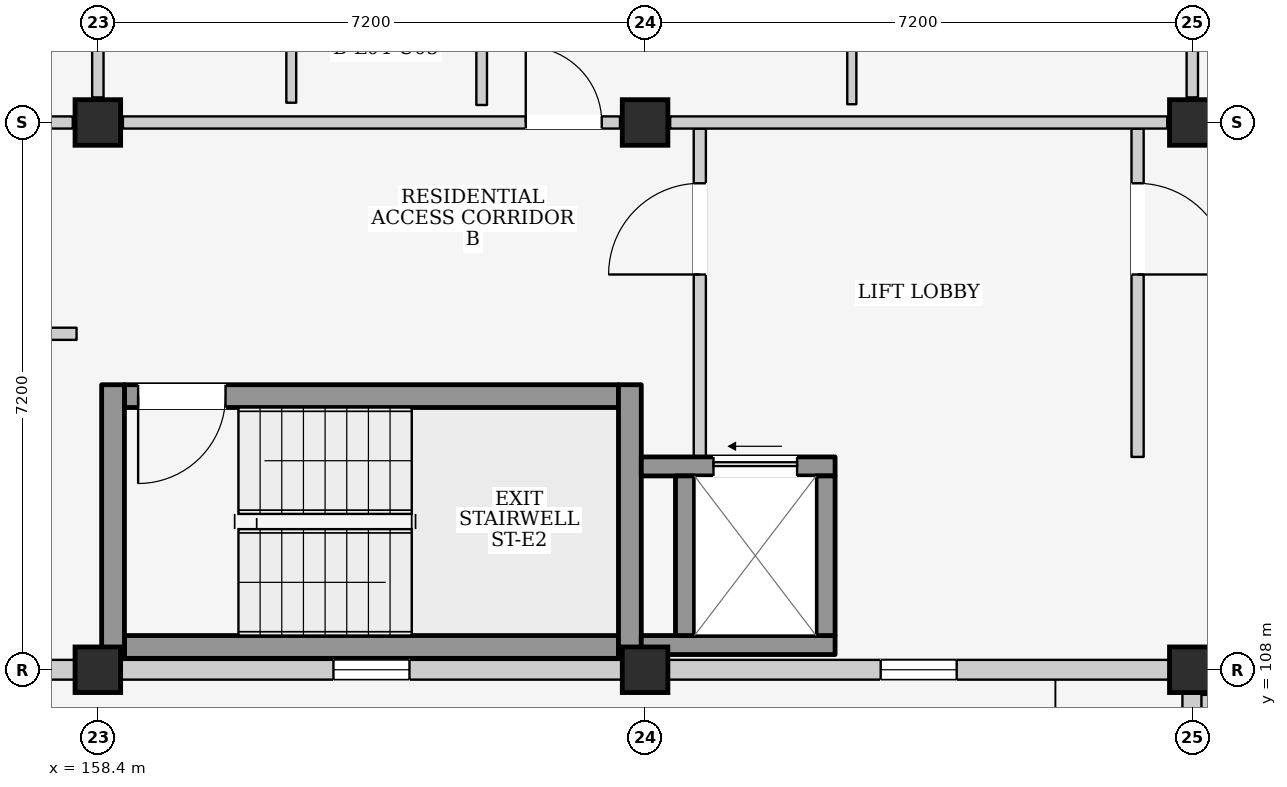
"""IFC4 building model, lengths in metres.
Left out: names, types, materials, properties, quantities, classifications, styles, units other than length and angle.
Written with IfcOpenShell. Run it as: python <this file> out.ifc"""

import sys

from ifc_helpers import new_model, si_unit, direction, frame, frame_2d, origin, origin_2d, place, context, subcontext, project, spatial, rectangle, extrude, element, fill, save


model = new_model("IFC4")
c1 = context("Model", 3, precision=1e-05, world=origin(), true_north=direction((0.0, 1.0)))
c2 = subcontext(c1, "Body", "Model", "MODEL_VIEW")
j1 = project(units=[si_unit("LENGTHUNIT", "METRE"), si_unit("PLANEANGLEUNIT", "RADIAN")], contexts=[c1])
p1 = place(None, origin())
s1 = spatial("IfcSite", under=j1, at=p1, CompositionType="ELEMENT")
p2 = place(p1, origin())
s2 = spatial("IfcBuilding", under=s1, at=p2, CompositionType="ELEMENT")
p3 = place(p2, frame((0.0, 0.0, 15.4)))
s3 = spatial("IfcBuildingStorey", under=s2, at=p3, CompositionType="ELEMENT", Elevation=15.4)
for number, where, z_axis, x_axis in (
    (1, (158.4, 108.0, 0.0), (0.0, 0.0, 1.0), (1.0, 0.0, 0.0)),
    (2, (158.4, 115.2, 0.0), (0.0, 0.0, 1.0), (1.0, 0.0, 0.0)),
    (3, (165.6, 108.0, 0.0), (0.0, 0.0, 1.0), (1.0, 0.0, 0.0)),
    (4, (165.6, 115.2, 0.0), (0.0, 0.0, 1.0), (1.0, 0.0, 0.0)),
    (5, (172.8, 108.0, 0.0), (0.0, 0.0, 1.0), (1.0, 0.0, 0.0)),
    (6, (172.8, 115.2, 0.0), (0.0, 0.0, 1.0), (1.0, 0.0, 0.0)),
):
    element("IfcColumn", number, at=place(p3, frame(where, z_axis=z_axis, x_axis=x_axis)), inside=s3, PredefinedType="COLUMN", context=c2, shape_type="SweptSolid", body=[
        extrude(rectangle(XDim=0.6, YDim=0.6, at=origin_2d()), origin(), (0.0, 0.0, 1.0), 3.2),
    ])
p4 = place(p3, frame((151.5, 108.0, 0.0), z_axis=(0.0, 0.0, 1.0), x_axis=(1.0, 0.0, 0.0)))
e7 = element("IfcWall", 7, at=p4, inside=s3, PredefinedType="ELEMENTEDWALL", context=c2, shape_type="SweptSolid", body=[
    extrude(rectangle(XDim=6.6, YDim=0.26, at=frame_2d((3.3, 0.0))), origin(), (0.0, 0.0, 1.0), 2.335),
])
p5 = place(p4, frame((1.1, 0.0, 0.0)))
e8 = element("IfcOpeningElement", 8, at=p5, cuts=e7, PredefinedType="OPENING", context=c2, shape_type="SweptSolid", body=[
    extrude(rectangle(XDim=1.5, YDim=2.12, at=frame_2d((0.75, 1.06))), frame((0.0, 0.145, 0.0), z_axis=(0.0, -1.0, 0.0), x_axis=(1.0, 0.0, 0.0)), (0.0, 0.0, 1.0), 0.29),
])
p6 = place(p4, frame((3.6, 0.0, 0.725)))
e9 = element("IfcOpeningElement", 9, at=p6, cuts=e7, PredefinedType="OPENING", context=c2, shape_type="SweptSolid", body=[
    extrude(rectangle(XDim=1.35, YDim=1.5, at=frame_2d((0.675, 0.75))), frame((0.0, 0.145, 0.0), z_axis=(0.0, -1.0, 0.0), x_axis=(1.0, 0.0, 0.0)), (0.0, 0.0, 1.0), 0.29),
])
p7 = place(p3, frame((158.7, 108.0, 0.0), z_axis=(0.0, 0.0, 1.0), x_axis=(1.0, 0.0, 0.0)))
e10 = element("IfcWall", 10, at=p7, inside=s3, PredefinedType="ELEMENTEDWALL", context=c2, shape_type="SweptSolid", body=[
    extrude(rectangle(XDim=6.6, YDim=0.26, at=frame_2d((3.3, 0.0))), origin(), (0.0, 0.0, 1.0), 2.335),
])
p8 = place(p7, frame((2.8, 0.0, 1.2)))
e11 = element("IfcOpeningElement", 11, at=p8, cuts=e10, PredefinedType="OPENING", context=c2, shape_type="SweptSolid", body=[
    extrude(rectangle(XDim=1.0, YDim=0.9, at=frame_2d((0.5, 0.45))), frame((0.0, 0.145, 0.0), z_axis=(0.0, -1.0, 0.0), x_axis=(1.0, 0.0, 0.0)), (0.0, 0.0, 1.0), 0.29),
])
p9 = place(p3, frame((165.9, 108.0, 0.0), z_axis=(0.0, 0.0, 1.0), x_axis=(1.0, 0.0, 0.0)))
e12 = element("IfcWall", 12, at=p9, inside=s3, PredefinedType="ELEMENTEDWALL", context=c2, shape_type="SweptSolid", body=[
    extrude(rectangle(XDim=6.6, YDim=0.26, at=frame_2d((3.3, 0.0))), origin(), (0.0, 0.0, 1.0), 2.335),
])
p10 = place(p9, frame((2.8, 0.0, 1.2)))
e13 = element("IfcOpeningElement", 13, at=p10, cuts=e12, PredefinedType="OPENING", context=c2, shape_type="SweptSolid", body=[
    extrude(rectangle(XDim=1.0, YDim=0.9, at=frame_2d((0.5, 0.45))), frame((0.0, 0.145, 0.0), z_axis=(0.0, -1.0, 0.0), x_axis=(1.0, 0.0, 0.0)), (0.0, 0.0, 1.0), 0.29),
])
p11 = place(p3, frame((172.8, 101.1, 0.0), z_axis=(0.0, 0.0, 1.0), x_axis=(0.0, 1.0, 0.0)))
e14 = element("IfcWall", 14, at=p11, inside=s3, PredefinedType="ELEMENTEDWALL", context=c2, shape_type="SweptSolid", body=[
    extrude(rectangle(XDim=6.6, YDim=0.26, at=frame_2d((3.3, 0.0))), origin(), (0.0, 0.0, 1.0), 2.385),
])
p12 = place(p11, frame((2.5, 0.0, 0.0)))
e15 = element("IfcOpeningElement", 15, at=p12, cuts=e14, PredefinedType="OPENING", context=c2, shape_type="SweptSolid", body=[
    extrude(rectangle(XDim=1.4, YDim=2.1, at=frame_2d((0.7, 1.05))), frame((0.0, 0.145, 0.0), z_axis=(0.0, -1.0, 0.0), x_axis=(1.0, 0.0, 0.0)), (0.0, 0.0, 1.0), 0.29),
])
p13 = place(p3, frame((158.75, 108.3, 0.0), z_axis=(0.0, 0.0, 1.0), x_axis=(1.0, 0.0, 0.0)))
e16 = element("IfcWall", 16, at=p13, inside=s3, PredefinedType="SHEAR", context=c2, shape_type="SweptSolid", body=[
    extrude(rectangle(XDim=6.5, YDim=0.3, at=frame_2d((3.25, 0.0))), origin(), (0.0, 0.0, 1.0), 2.95),
])
p14 = place(p3, frame((158.75, 111.6, 0.0), z_axis=(0.0, 0.0, 1.0), x_axis=(1.0, 0.0, 0.0)))
e17 = element("IfcWall", 17, at=p14, inside=s3, PredefinedType="SHEAR", context=c2, shape_type="SweptSolid", body=[
    extrude(rectangle(XDim=6.5, YDim=0.3, at=frame_2d((3.25, 0.0))), origin(), (0.0, 0.0, 1.0), 2.95),
])
p15 = place(p14, frame((0.18, 0.0, 0.0)))
e18 = element("IfcOpeningElement", 18, at=p15, cuts=e17, PredefinedType="OPENING", context=c2, shape_type="SweptSolid", body=[
    extrude(rectangle(XDim=1.15, YDim=2.2, at=frame_2d((0.575, 1.1))), frame((0.0, 0.165, 0.0), z_axis=(0.0, -1.0, 0.0), x_axis=(1.0, 0.0, 0.0)), (0.0, 0.0, 1.0), 0.33),
])
for number, where, z_axis, x_axis in (
    (19, (158.6, 108.15, 0.0), (0.0, 0.0, 1.0), (0.0, 1.0, 0.0)),
    (20, (165.4, 108.15, 0.0), (0.0, 0.0, 1.0), (0.0, 1.0, 0.0)),
):
    element("IfcWall", number, at=place(p3, frame(where, z_axis=z_axis, x_axis=x_axis)), inside=s3, PredefinedType="SHEAR", context=c2, shape_type="SweptSolid", body=[
        extrude(rectangle(XDim=3.6, YDim=0.3, at=frame_2d((1.8, 0.0))), origin(), (0.0, 0.0, 1.0), 2.95),
    ])
p16 = place(p3, frame((166.32, 110.8, 0.0), z_axis=(0.0, 0.0, 1.0), x_axis=(0.0, 1.0, 0.0)))
e21 = element("IfcWall", 21, at=p16, inside=s3, PredefinedType="PARTITIONING", context=c2, shape_type="SweptSolid", body=[
    extrude(rectangle(XDim=4.32, YDim=0.16, at=frame_2d((2.16, 0.0))), origin(), (0.0, 0.0, 1.0), 2.95),
])
p17 = place(p16, frame((2.4, 0.0, 0.0)))
e22 = element("IfcOpeningElement", 22, at=p17, cuts=e21, PredefinedType="OPENING", context=c2, shape_type="SweptSolid", body=[
    extrude(rectangle(XDim=1.2, YDim=2.2, at=frame_2d((0.6, 1.1))), frame((0.0, 0.095, 0.0), z_axis=(0.0, -1.0, 0.0), x_axis=(1.0, 0.0, 0.0)), (0.0, 0.0, 1.0), 0.19),
])
p18 = place(p3, frame((172.08, 110.8, 0.0), z_axis=(0.0, 0.0, 1.0), x_axis=(0.0, 1.0, 0.0)))
e23 = element("IfcWall", 23, at=p18, inside=s3, PredefinedType="PARTITIONING", context=c2, shape_type="SweptSolid", body=[
    extrude(rectangle(XDim=4.32, YDim=0.16, at=frame_2d((2.16, 0.0))), origin(), (0.0, 0.0, 1.0), 2.95),
])
p19 = place(p18, frame((2.4, 0.0, 0.0)))
e24 = element("IfcOpeningElement", 24, at=p19, cuts=e23, PredefinedType="OPENING", context=c2, shape_type="SweptSolid", body=[
    extrude(rectangle(XDim=1.2, YDim=2.2, at=frame_2d((0.6, 1.1))), frame((0.0, 0.095, 0.0), z_axis=(0.0, -1.0, 0.0), x_axis=(1.0, 0.0, 0.0)), (0.0, 0.0, 1.0), 0.19),
])
p20 = place(p3, frame((165.55, 108.325, 0.0), z_axis=(0.0, 0.0, 1.0), x_axis=(1.0, 0.0, 0.0)))
e25 = element("IfcWall", 25, at=p20, inside=s3, PredefinedType="SHEAR", context=c2, shape_type="SweptSolid", body=[
    extrude(rectangle(XDim=2.55, YDim=0.25, at=frame_2d((1.275, 0.0))), origin(), (0.0, 0.0, 1.0), 2.95),
])
p21 = place(p3, frame((165.55, 110.675, 0.0), z_axis=(0.0, 0.0, 1.0), x_axis=(1.0, 0.0, 0.0)))
e26 = element("IfcWall", 26, at=p21, inside=s3, PredefinedType="SHEAR", context=c2, shape_type="SweptSolid", body=[
    extrude(rectangle(XDim=2.55, YDim=0.25, at=frame_2d((1.275, 0.0))), origin(), (0.0, 0.0, 1.0), 2.95),
])
p22 = place(p21, frame((0.95, 0.0, 0.0)))
e27 = element("IfcOpeningElement", 27, at=p22, cuts=e26, PredefinedType="OPENING", context=c2, shape_type="SweptSolid", body=[
    extrude(rectangle(XDim=1.1, YDim=2.15, at=frame_2d((0.55, 1.075))), frame((0.0, 0.14, 0.0), z_axis=(0.0, -1.0, 0.0), x_axis=(1.0, 0.0, 0.0)), (0.0, 0.0, 1.0), 0.28),
])
for number, where, z_axis, x_axis in (
    (28, (166.125, 108.45, 0.0), (0.0, 0.0, 1.0), (0.0, 1.0, 0.0)),
    (29, (167.975, 108.45, 0.0), (0.0, 0.0, 1.0), (0.0, 1.0, 0.0)),
):
    element("IfcWall", number, at=place(p3, frame(where, z_axis=z_axis, x_axis=x_axis)), inside=s3, PredefinedType="SHEAR", context=c2, shape_type="SweptSolid", body=[
        extrude(rectangle(XDim=2.1, YDim=0.25, at=frame_2d((1.05, 0.0))), origin(), (0.0, 0.0, 1.0), 2.95),
    ])
p23 = place(p3, frame((151.53, 115.2, 0.0), z_axis=(0.0, 0.0, 1.0), x_axis=(1.0, 0.0, 0.0)))
e30 = element("IfcWall", 30, at=p23, inside=s3, PredefinedType="PARTITIONING", context=c2, shape_type="SweptSolid", body=[
    extrude(rectangle(XDim=6.54, YDim=0.16, at=frame_2d((3.27, 0.0))), origin(), (0.0, 0.0, 1.0), 2.335),
])
p24 = place(p23, frame((4.12, 0.0, 0.0)))
e31 = element("IfcOpeningElement", 31, at=p24, cuts=e30, PredefinedType="OPENING", context=c2, shape_type="SweptSolid", body=[
    extrude(rectangle(XDim=1.0, YDim=2.15, at=frame_2d((0.5, 1.075))), frame((0.0, 0.095, 0.0), z_axis=(0.0, -1.0, 0.0), x_axis=(1.0, 0.0, 0.0)), (0.0, 0.0, 1.0), 0.19),
])
p25 = place(p3, frame((158.4, 115.53, 0.0), z_axis=(0.0, 0.0, 1.0), x_axis=(0.0, 1.0, 0.0)))
e32 = element("IfcWall", 32, at=p25, inside=s3, PredefinedType="PARTITIONING", context=c2, shape_type="SweptSolid", body=[
    extrude(rectangle(XDim=6.54, YDim=0.15, at=frame_2d((3.27, 0.0))), origin(), (0.0, 0.0, 1.0), 2.385),
])
p26 = place(p3, frame((158.73, 115.2, 0.0), z_axis=(0.0, 0.0, 1.0), x_axis=(1.0, 0.0, 0.0)))
e33 = element("IfcWall", 33, at=p26, inside=s3, PredefinedType="PARTITIONING", context=c2, shape_type="SweptSolid", body=[
    extrude(rectangle(XDim=6.54, YDim=0.16, at=frame_2d((3.27, 0.0))), origin(), (0.0, 0.0, 1.0), 2.335),
])
p27 = place(p26, frame((5.3, 0.0, 0.0)))
e34 = element("IfcOpeningElement", 34, at=p27, cuts=e33, PredefinedType="OPENING", context=c2, shape_type="SweptSolid", body=[
    extrude(rectangle(XDim=1.0, YDim=2.15, at=frame_2d((0.5, 1.075))), frame((0.0, 0.095, 0.0), z_axis=(0.0, -1.0, 0.0), x_axis=(1.0, 0.0, 0.0)), (0.0, 0.0, 1.0), 0.19),
])
p28 = place(p3, frame((165.93, 115.2, 0.0), z_axis=(0.0, 0.0, 1.0), x_axis=(1.0, 0.0, 0.0)))
e35 = element("IfcWall", 35, at=p28, inside=s3, PredefinedType="PARTITIONING", context=c2, shape_type="SweptSolid", body=[
    extrude(rectangle(XDim=6.54, YDim=0.16, at=frame_2d((3.27, 0.0))), origin(), (0.0, 0.0, 1.0), 2.335),
])
p29 = place(p3, frame((172.8, 115.53, 0.0), z_axis=(0.0, 0.0, 1.0), x_axis=(0.0, 1.0, 0.0)))
e36 = element("IfcWall", 36, at=p29, inside=s3, PredefinedType="PARTITIONING", context=c2, shape_type="SweptSolid", body=[
    extrude(rectangle(XDim=6.54, YDim=0.15, at=frame_2d((3.27, 0.0))), origin(), (0.0, 0.0, 1.0), 2.385),
])
p30 = place(p3, frame((160.945, 115.46, 0.0), z_axis=(0.0, 0.0, 1.0), x_axis=(0.0, 1.0, 0.0)))
e37 = element("IfcWall", 37, at=p30, inside=s3, PredefinedType="PARTITIONING", context=c2, shape_type="SweptSolid", body=[
    extrude(rectangle(XDim=3.04, YDim=0.13, at=frame_2d((1.52, 0.0))), origin(), (0.0, 0.0, 1.0), 2.95),
])
p31 = place(p3, frame((163.45, 115.43, 0.0), z_axis=(0.0, 0.0, 1.0), x_axis=(0.0, 1.0, 0.0)))
e38 = element("IfcWall", 38, at=p31, inside=s3, PredefinedType="PARTITIONING", context=c2, shape_type="SweptSolid", body=[
    extrude(rectangle(XDim=3.06, YDim=0.14, at=frame_2d((1.53, 0.0))), origin(), (0.0, 0.0, 1.0), 2.95),
])
p32 = place(p3, frame((168.32, 115.44, 0.0), z_axis=(0.0, 0.0, 1.0), x_axis=(0.0, 1.0, 0.0)))
e39 = element("IfcWall", 39, at=p32, inside=s3, PredefinedType="PARTITIONING", context=c2, shape_type="SweptSolid", body=[
    extrude(rectangle(XDim=3.04, YDim=0.12, at=frame_2d((1.52, 0.0))), origin(), (0.0, 0.0, 1.0), 2.95),
])
p33 = place(p32, frame((1.04, 0.0, 0.0)))
e40 = element("IfcOpeningElement", 40, at=p33, cuts=e39, PredefinedType="OPENING", context=c2, shape_type="SweptSolid", body=[
    extrude(rectangle(XDim=0.96, YDim=2.15, at=frame_2d((0.48, 1.075))), frame((0.0, 0.075, 0.0), z_axis=(0.0, -1.0, 0.0), x_axis=(1.0, 0.0, 0.0)), (0.0, 0.0, 1.0), 0.15),
])
p34 = place(p3, frame((151.48, 112.42, 0.0), z_axis=(0.0, 0.0, 1.0), x_axis=(1.0, 0.0, 0.0)))
e41 = element("IfcWall", 41, at=p34, inside=s3, PredefinedType="PARTITIONING", context=c2, shape_type="SweptSolid", body=[
    extrude(rectangle(XDim=6.64, YDim=0.16, at=frame_2d((3.32, 0.0))), origin(), (0.0, 0.0, 1.0), 2.95),
])
p35 = place(p34, frame((2.78, 0.0, 0.0)))
e42 = element("IfcOpeningElement", 42, at=p35, cuts=e41, PredefinedType="OPENING", context=c2, shape_type="SweptSolid", body=[
    extrude(rectangle(XDim=1.08, YDim=2.22, at=frame_2d((0.54, 1.11))), frame((0.0, 0.095, 0.0), z_axis=(0.0, -1.0, 0.0), x_axis=(1.0, 0.0, 0.0)), (0.0, 0.0, 1.0), 0.19),
])
p36 = place(p3, frame((173.0, 101.13, 0.0), z_axis=(0.0, 0.0, 1.0), x_axis=(0.0, 1.0, 0.0)))
e43 = element("IfcWall", 43, at=p36, inside=s3, PredefinedType="PARTITIONING", context=c2, shape_type="SweptSolid", body=[
    extrude(rectangle(XDim=6.54, YDim=0.16, at=frame_2d((3.27, 0.0))), origin(), (0.0, 0.0, 1.0), 2.385),
])
p37 = place(p36, frame((2.76, 0.0, 0.0)))
e44 = element("IfcOpeningElement", 44, at=p37, cuts=e43, PredefinedType="OPENING", context=c2, shape_type="SweptSolid", body=[
    extrude(rectangle(XDim=1.02, YDim=2.18, at=frame_2d((0.51, 1.09))), frame((0.0, 0.095, 0.0), z_axis=(0.0, -1.0, 0.0), x_axis=(1.0, 0.0, 0.0)), (0.0, 0.0, 1.0), 0.19),
])
p38 = place(p8, origin())
e45 = element("IfcWindow", 45, at=p38, inside=s3, PartitioningType="SINGLE_PANEL", PredefinedType="WINDOW", context=c2, shape_type="SweptSolid", body=[
    extrude(rectangle(XDim=1.0, YDim=0.9, at=frame_2d((0.5, 0.45))), frame((0.0, 0.03, 0.0), z_axis=(0.0, -1.0, 0.0), x_axis=(1.0, 0.0, 0.0)), (0.0, 0.0, 1.0), 0.06),
])
fill(e11, e45)
p39 = place(p10, origin())
e46 = element("IfcWindow", 46, at=p39, inside=s3, PartitioningType="SINGLE_PANEL", PredefinedType="WINDOW", context=c2, shape_type="SweptSolid", body=[
    extrude(rectangle(XDim=1.0, YDim=0.9, at=frame_2d((0.5, 0.45))), frame((0.0, 0.03, 0.0), z_axis=(0.0, -1.0, 0.0), x_axis=(1.0, 0.0, 0.0)), (0.0, 0.0, 1.0), 0.06),
])
fill(e13, e46)
p40 = place(p15, frame((1.15, 0.0, 0.0), z_axis=(0.0, 0.0, 1.0), x_axis=(-1.0, 0.0, 0.0)))
e47 = element("IfcDoor", 47, at=p40, inside=s3, OperationType="SINGLE_SWING_RIGHT", PredefinedType="DOOR", context=c2, shape_type="SweptSolid", body=[
    extrude(rectangle(XDim=1.15, YDim=2.2, at=frame_2d((0.575, 1.1))), frame((0.0, 0.025, 0.0), z_axis=(0.0, -1.0, 0.0), x_axis=(1.0, 0.0, 0.0)), (0.0, 0.0, 1.0), 0.05),
])
fill(e18, e47)
p41 = place(p17, origin())
e48 = element("IfcDoor", 48, at=p41, inside=s3, OperationType="SINGLE_SWING_LEFT", PredefinedType="DOOR", context=c2, shape_type="SweptSolid", body=[
    extrude(rectangle(XDim=1.2, YDim=2.2, at=frame_2d((0.6, 1.1))), frame((0.0, 0.025, 0.0), z_axis=(0.0, -1.0, 0.0), x_axis=(1.0, 0.0, 0.0)), (0.0, 0.0, 1.0), 0.05),
])
fill(e22, e48)
p42 = place(p19, frame((1.2, 0.0, 0.0), z_axis=(0.0, 0.0, 1.0), x_axis=(-1.0, 0.0, 0.0)))
e49 = element("IfcDoor", 49, at=p42, inside=s3, OperationType="SINGLE_SWING_RIGHT", PredefinedType="DOOR", context=c2, shape_type="SweptSolid", body=[
    extrude(rectangle(XDim=1.2, YDim=2.2, at=frame_2d((0.6, 1.1))), frame((0.0, 0.025, 0.0), z_axis=(0.0, -1.0, 0.0), x_axis=(1.0, 0.0, 0.0)), (0.0, 0.0, 1.0), 0.05),
])
fill(e24, e49)
p43 = place(p22, origin())
e50 = element("IfcDoor", 50, at=p43, inside=s3, OperationType="SLIDING_TO_LEFT", PredefinedType="DOOR", context=c2, shape_type="SweptSolid", body=[
    extrude(rectangle(XDim=1.1, YDim=2.15, at=frame_2d((0.55, 1.075))), frame((0.0, 0.025, 0.0), z_axis=(0.0, -1.0, 0.0), x_axis=(1.0, 0.0, 0.0)), (0.0, 0.0, 1.0), 0.05),
])
fill(e27, e50)
p44 = place(p27, origin())
e51 = element("IfcDoor", 51, at=p44, inside=s3, OperationType="SINGLE_SWING_LEFT", PredefinedType="DOOR", context=c2, shape_type="SweptSolid", body=[
    extrude(rectangle(XDim=1.0, YDim=2.15, at=frame_2d((0.5, 1.075))), frame((0.0, 0.025, 0.0), z_axis=(0.0, -1.0, 0.0), x_axis=(1.0, 0.0, 0.0)), (0.0, 0.0, 1.0), 0.05),
])
fill(e34, e51)
save(model, sys.argv[1])
